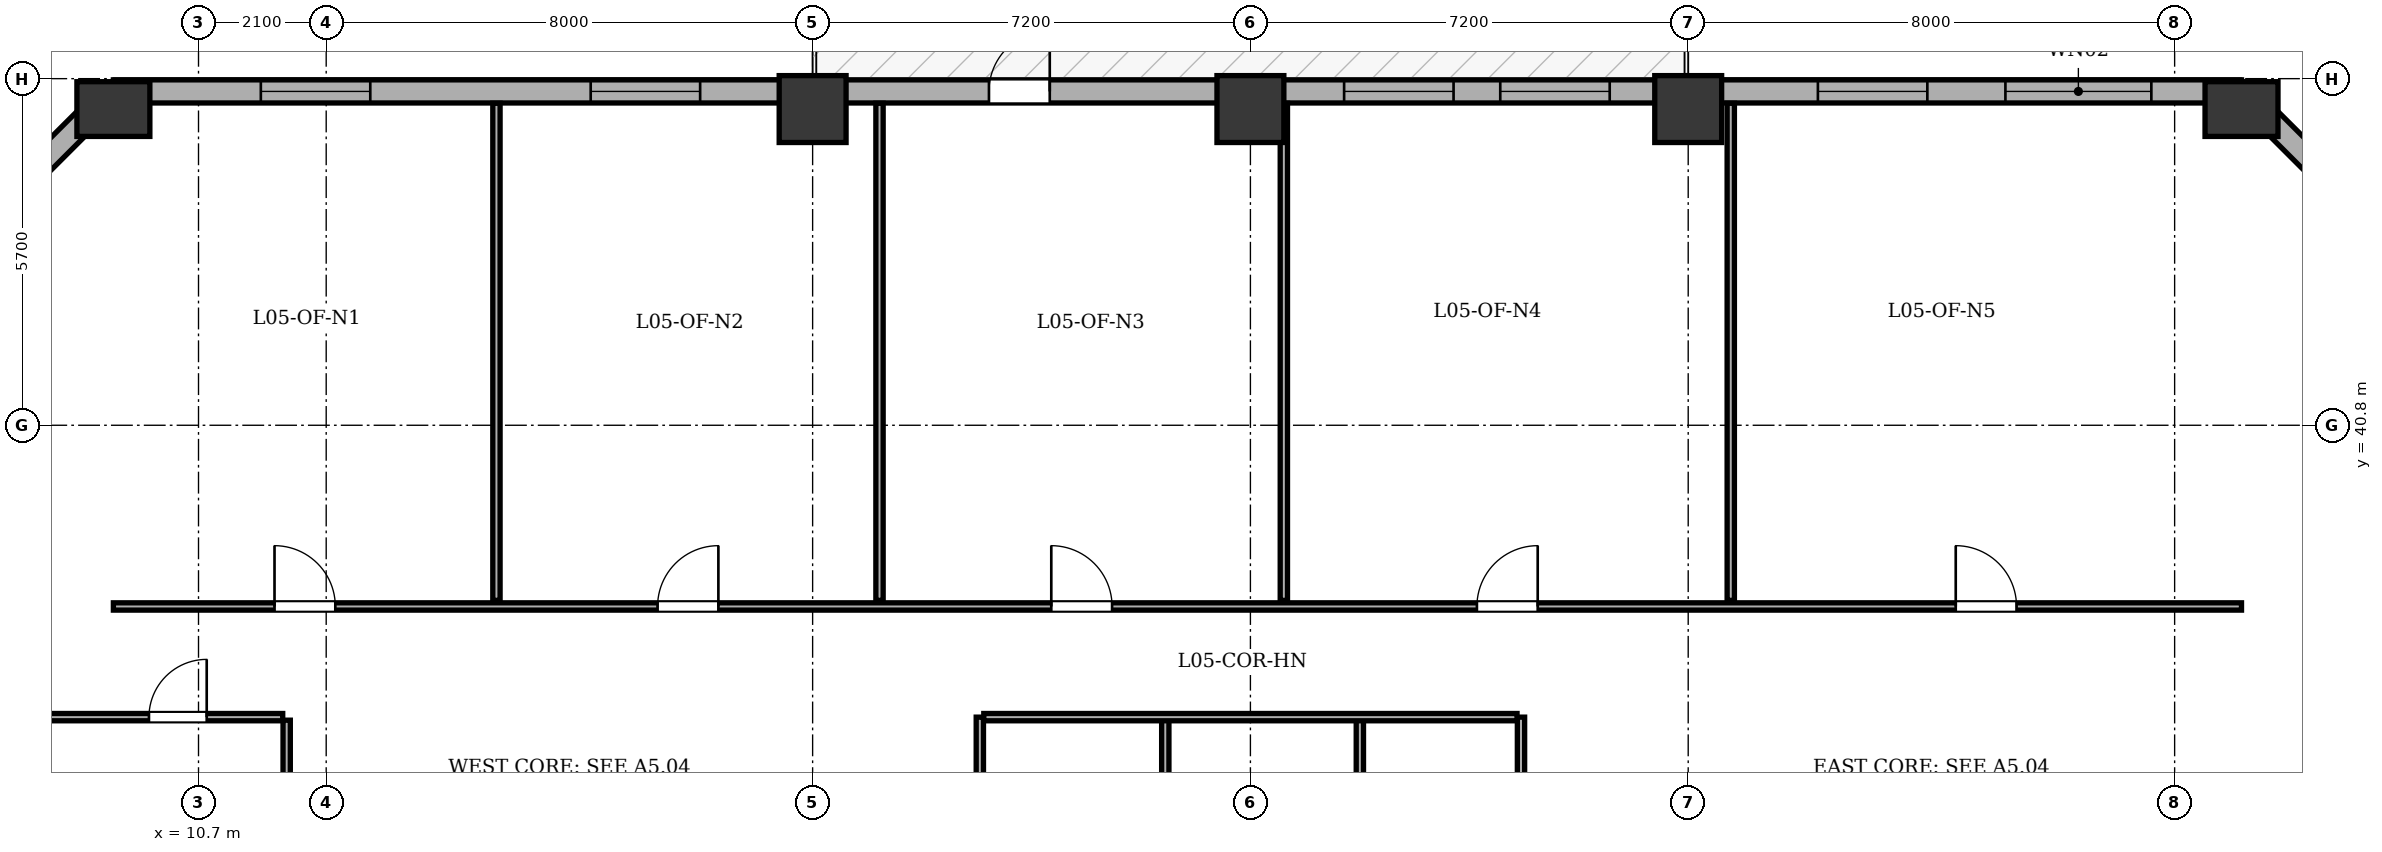
"""IFC4 building model, lengths in metres.
Left out: names, types, materials, properties, quantities, classifications, styles, units other than length and angle.
Written with IfcOpenShell. Run it as: python <this file> out.ifc"""

import sys

from ifc_helpers import new_model, si_unit, direction, frame, frame_2d, origin, origin_2d, place, context, subcontext, project, spatial, rectangle, extrude, element, fill, save


model = new_model("IFC4")
c1 = context("Model", 3, precision=1e-05, world=origin(), true_north=direction((0.0, 1.0)))
c2 = subcontext(c1, "Body", "Model", "MODEL_VIEW")
j1 = project(units=[si_unit("LENGTHUNIT", "METRE"), si_unit("PLANEANGLEUNIT", "RADIAN")], contexts=[c1])
p1 = place(None, origin())
s1 = spatial("IfcSite", under=j1, at=p1, CompositionType="ELEMENT")
p2 = place(p1, origin())
s2 = spatial("IfcBuilding", under=s1, at=p2, CompositionType="ELEMENT")
p3 = place(p2, frame((0.0, 0.0, 24.3)))
s3 = spatial("IfcBuildingStorey", under=s2, at=p3, CompositionType="ELEMENT", Elevation=24.3)
p4 = place(p3, frame((9.3, 46.0, 0.0), z_axis=(0.0, 0.0, 1.0), x_axis=(1.0, 0.0, 0.0)))
e1 = element("IfcColumn", 1, at=p4, inside=s3, PredefinedType="COLUMN", context=c2, shape_type="SweptSolid", body=[
    extrude(rectangle(XDim=0.9, YDim=1.2, at=origin_2d()), origin(), (0.0, 0.0, 1.0), 3.9),
])
for number, where, z_axis, x_axis in (
    (2, (20.8, 46.0, 0.0), (0.0, 0.0, 1.0), (1.0, 0.0, 0.0)),
    (3, (28.0, 46.0, 0.0), (0.0, 0.0, 1.0), (1.0, 0.0, 0.0)),
    (4, (35.2, 46.0, 0.0), (0.0, 0.0, 1.0), (1.0, 0.0, 0.0)),
):
    element("IfcColumn", number, at=place(p3, frame(where, z_axis=z_axis, x_axis=x_axis)), inside=s3, PredefinedType="COLUMN", context=c2, shape_type="SweptSolid", body=[
        extrude(rectangle(XDim=1.1, YDim=1.1, at=origin_2d()), origin(), (0.0, 0.0, 1.0), 3.9),
    ])
p5 = place(p3, frame((44.3, 46.0, 0.0), z_axis=(0.0, 0.0, 1.0), x_axis=(1.0, 0.0, 0.0)))
e5 = element("IfcColumn", 5, at=p5, inside=s3, PredefinedType="COLUMN", context=c2, shape_type="SweptSolid", body=[
    extrude(rectangle(XDim=0.9, YDim=1.2, at=origin_2d()), origin(), (0.0, 0.0, 1.0), 3.9),
])
p6 = place(p3, frame((4.51, 41.5, 0.0), z_axis=(0.0, 0.0, 1.0), x_axis=(0.707106781187, 0.707106781187, 0.0)))
e6 = element("IfcWall", 6, at=p6, inside=s3, PredefinedType="STANDARD", context=c2, shape_type="SweptSolid", body=[
    extrude(rectangle(XDim=6.774, YDim=0.38, at=frame_2d((3.387, 0.0))), origin(), (0.0, 0.0, 1.0), 3.135),
])
p7 = place(p6, frame((2.687, 0.0, 0.8)))
e7 = element("IfcOpeningElement", 7, at=p7, cuts=e6, PredefinedType="OPENING", context=c2, shape_type="SweptSolid", body=[
    extrude(rectangle(XDim=1.4, YDim=1.65, at=frame_2d((0.7, 0.825))), frame((0.0, 0.2, 0.0), z_axis=(0.0, -1.0, 0.0), x_axis=(1.0, 0.0, 0.0)), (0.0, 0.0, 1.0), 0.4),
])
p8 = place(p3, frame((9.3, 46.29, 0.0), z_axis=(0.0, 0.0, 1.0), x_axis=(1.0, 0.0, 0.0)))
e8 = element("IfcWall", 8, at=p8, inside=s3, PredefinedType="STANDARD", context=c2, shape_type="SweptSolid", body=[
    extrude(rectangle(XDim=35.0, YDim=0.38, at=frame_2d((17.5, 0.0))), origin(), (0.0, 0.0, 1.0), 3.135),
])
p9 = place(p8, frame((14.4, 0.0, 0.0)))
e9 = element("IfcOpeningElement", 9, at=p9, cuts=e8, PredefinedType="OPENING", context=c2, shape_type="SweptSolid", body=[
    extrude(rectangle(XDim=1.0, YDim=2.02, at=frame_2d((0.5, 1.01))), frame((0.0, 0.2, 0.0), z_axis=(0.0, -1.0, 0.0), x_axis=(1.0, 0.0, 0.0)), (0.0, 0.0, 1.0), 0.4),
])
p10 = place(p8, frame((2.425, 0.0, 0.8)))
e10 = element("IfcOpeningElement", 10, at=p10, cuts=e8, PredefinedType="OPENING", context=c2, shape_type="SweptSolid", body=[
    extrude(rectangle(XDim=1.8, YDim=1.9, at=frame_2d((0.9, 0.95))), frame((0.0, 0.2, 0.0), z_axis=(0.0, -1.0, 0.0), x_axis=(1.0, 0.0, 0.0)), (0.0, 0.0, 1.0), 0.4),
])
p11 = place(p8, frame((7.85, 0.0, 0.8)))
e11 = element("IfcOpeningElement", 11, at=p11, cuts=e8, PredefinedType="OPENING", context=c2, shape_type="SweptSolid", body=[
    extrude(rectangle(XDim=1.8, YDim=1.9, at=frame_2d((0.9, 0.95))), frame((0.0, 0.2, 0.0), z_axis=(0.0, -1.0, 0.0), x_axis=(1.0, 0.0, 0.0)), (0.0, 0.0, 1.0), 0.4),
])
p12 = place(p8, frame((20.241, 0.0, 0.8)))
e12 = element("IfcOpeningElement", 12, at=p12, cuts=e8, PredefinedType="OPENING", context=c2, shape_type="SweptSolid", body=[
    extrude(rectangle(XDim=1.8, YDim=1.9, at=frame_2d((0.9, 0.95))), frame((0.0, 0.2, 0.0), z_axis=(0.0, -1.0, 0.0), x_axis=(1.0, 0.0, 0.0)), (0.0, 0.0, 1.0), 0.4),
])
p13 = place(p8, frame((22.809, 0.0, 0.8)))
e13 = element("IfcOpeningElement", 13, at=p13, cuts=e8, PredefinedType="OPENING", context=c2, shape_type="SweptSolid", body=[
    extrude(rectangle(XDim=1.8, YDim=1.9, at=frame_2d((0.9, 0.95))), frame((0.0, 0.2, 0.0), z_axis=(0.0, -1.0, 0.0), x_axis=(1.0, 0.0, 0.0)), (0.0, 0.0, 1.0), 0.4),
])
p14 = place(p8, frame((28.033, 0.0, 0.8)))
e14 = element("IfcOpeningElement", 14, at=p14, cuts=e8, PredefinedType="OPENING", context=c2, shape_type="SweptSolid", body=[
    extrude(rectangle(XDim=1.8, YDim=1.9, at=frame_2d((0.9, 0.95))), frame((0.0, 0.2, 0.0), z_axis=(0.0, -1.0, 0.0), x_axis=(1.0, 0.0, 0.0)), (0.0, 0.0, 1.0), 0.4),
])
p15 = place(p8, frame((31.117, 0.0, 0.8)))
e15 = element("IfcOpeningElement", 15, at=p15, cuts=e8, PredefinedType="OPENING", context=c2, shape_type="SweptSolid", body=[
    extrude(rectangle(XDim=2.4, YDim=1.9, at=frame_2d((1.2, 0.95))), frame((0.0, 0.2, 0.0), z_axis=(0.0, -1.0, 0.0), x_axis=(1.0, 0.0, 0.0)), (0.0, 0.0, 1.0), 0.4),
])
p16 = place(p3, frame((44.3, 46.29, 0.0), z_axis=(0.0, 0.0, 1.0), x_axis=(0.707106781187, -0.707106781187, 0.0)))
e16 = element("IfcWall", 16, at=p16, inside=s3, PredefinedType="STANDARD", context=c2, shape_type="SweptSolid", body=[
    extrude(rectangle(XDim=6.774, YDim=0.38, at=frame_2d((3.387, 0.0))), origin(), (0.0, 0.0, 1.0), 3.135),
])
p17 = place(p16, frame((2.687, 0.0, 0.8)))
e17 = element("IfcOpeningElement", 17, at=p17, cuts=e16, PredefinedType="OPENING", context=c2, shape_type="SweptSolid", body=[
    extrude(rectangle(XDim=1.4, YDim=1.65, at=frame_2d((0.7, 0.825))), frame((0.0, 0.2, 0.0), z_axis=(0.0, -1.0, 0.0), x_axis=(1.0, 0.0, 0.0)), (0.0, 0.0, 1.0), 0.4),
])
for number, where, z_axis, x_axis in (
    (18, (23.55, 24.715, 0.0), (0.0, 0.0, 1.0), (0.0, 1.0, 0.0)),
    (19, (32.45, 24.715, 0.0), (0.0, 0.0, 1.0), (0.0, 1.0, 0.0)),
    (20, (26.6, 24.715, 0.0), (0.0, 0.0, 1.0), (0.0, 1.0, 0.0)),
):
    element("IfcWall", number, at=place(p3, frame(where, z_axis=z_axis, x_axis=x_axis)), inside=s3, PredefinedType="PARTITIONING", context=c2, shape_type="SweptSolid", body=[
        extrude(rectangle(XDim=11.285, YDim=0.12, at=frame_2d((5.643, 0.0))), origin(), (0.0, 0.0, 1.0), 3.6),
    ])
p18 = place(p3, frame((29.8, 24.715, 0.0), z_axis=(0.0, 0.0, 1.0), x_axis=(0.0, 1.0, 0.0)))
e21 = element("IfcWall", 21, at=p18, inside=s3, PredefinedType="PARTITIONING", context=c2, shape_type="SweptSolid", body=[
    extrude(rectangle(XDim=11.285, YDim=0.12, at=frame_2d((5.643, 0.0))), origin(), (0.0, 0.0, 1.0), 3.135),
])
p19 = place(p3, frame((23.615, 36.0, 0.0), z_axis=(0.0, 0.0, 1.0), x_axis=(1.0, 0.0, 0.0)))
e22 = element("IfcWall", 22, at=p19, inside=s3, PredefinedType="PARTITIONING", context=c2, shape_type="SweptSolid", body=[
    extrude(rectangle(XDim=8.77, YDim=0.12, at=frame_2d((4.385, 0.0))), origin(), (0.0, 0.0, 1.0), 3.6),
])
p20 = place(p3, frame((9.3, 37.82, 0.0), z_axis=(0.0, 0.0, 1.0), x_axis=(1.0, 0.0, 0.0)))
e23 = element("IfcWall", 23, at=p20, inside=s3, PredefinedType="PARTITIONING", context=c2, shape_type="SweptSolid", body=[
    extrude(rectangle(XDim=35.0, YDim=0.12, at=frame_2d((17.5, 0.0))), origin(), (0.0, 0.0, 1.0), 3.6),
])
p21 = place(p20, frame((2.65, 0.0, 0.0)))
e24 = element("IfcOpeningElement", 24, at=p21, cuts=e23, PredefinedType="OPENING", context=c2, shape_type="SweptSolid", body=[
    extrude(rectangle(XDim=1.0, YDim=2.1, at=frame_2d((0.5, 1.05))), frame((0.0, 0.07, 0.0), z_axis=(0.0, -1.0, 0.0), x_axis=(1.0, 0.0, 0.0)), (0.0, 0.0, 1.0), 0.14),
])
p22 = place(p20, frame((8.95, 0.0, 0.0)))
e25 = element("IfcOpeningElement", 25, at=p22, cuts=e23, PredefinedType="OPENING", context=c2, shape_type="SweptSolid", body=[
    extrude(rectangle(XDim=1.0, YDim=2.1, at=frame_2d((0.5, 1.05))), frame((0.0, 0.07, 0.0), z_axis=(0.0, -1.0, 0.0), x_axis=(1.0, 0.0, 0.0)), (0.0, 0.0, 1.0), 0.14),
])
p23 = place(p20, frame((15.425, 0.0, 0.0)))
e26 = element("IfcOpeningElement", 26, at=p23, cuts=e23, PredefinedType="OPENING", context=c2, shape_type="SweptSolid", body=[
    extrude(rectangle(XDim=1.0, YDim=2.1, at=frame_2d((0.5, 1.05))), frame((0.0, 0.07, 0.0), z_axis=(0.0, -1.0, 0.0), x_axis=(1.0, 0.0, 0.0)), (0.0, 0.0, 1.0), 0.14),
])
p24 = place(p20, frame((22.425, 0.0, 0.0)))
e27 = element("IfcOpeningElement", 27, at=p24, cuts=e23, PredefinedType="OPENING", context=c2, shape_type="SweptSolid", body=[
    extrude(rectangle(XDim=1.0, YDim=2.1, at=frame_2d((0.5, 1.05))), frame((0.0, 0.07, 0.0), z_axis=(0.0, -1.0, 0.0), x_axis=(1.0, 0.0, 0.0)), (0.0, 0.0, 1.0), 0.14),
])
p25 = place(p20, frame((30.3, 0.0, 0.0)))
e28 = element("IfcOpeningElement", 28, at=p25, cuts=e23, PredefinedType="OPENING", context=c2, shape_type="SweptSolid", body=[
    extrude(rectangle(XDim=1.0, YDim=2.1, at=frame_2d((0.5, 1.05))), frame((0.0, 0.07, 0.0), z_axis=(0.0, -1.0, 0.0), x_axis=(1.0, 0.0, 0.0)), (0.0, 0.0, 1.0), 0.14),
])
for number, where, z_axis, x_axis in (
    (29, (15.6, 37.92, 0.0), (0.0, 0.0, 1.0), (0.0, 1.0, 0.0)),
    (30, (21.9, 37.92, 0.0), (0.0, 0.0, 1.0), (0.0, 1.0, 0.0)),
    (31, (28.55, 37.92, 0.0), (0.0, 0.0, 1.0), (0.0, 1.0, 0.0)),
    (32, (35.9, 37.92, 0.0), (0.0, 0.0, 1.0), (0.0, 1.0, 0.0)),
):
    element("IfcWall", number, at=place(p3, frame(where, z_axis=z_axis, x_axis=x_axis)), inside=s3, PredefinedType="PARTITIONING", context=c2, shape_type="SweptSolid", body=[
        extrude(rectangle(XDim=8.175, YDim=0.12, at=frame_2d((4.087, 0.0))), origin(), (0.0, 0.0, 1.0), 3.6),
    ])
p26 = place(p3, frame((12.15, 18.45, 0.0), z_axis=(0.0, 0.0, 1.0), x_axis=(0.0, 1.0, 0.0)))
e33 = element("IfcWall", 33, at=p26, inside=s3, PredefinedType="PARTITIONING", context=c2, shape_type="SweptSolid", body=[
    extrude(rectangle(XDim=17.5, YDim=0.12, at=frame_2d((8.75, 0.0))), origin(), (0.0, 0.0, 1.0), 3.6),
])
p27 = place(p3, frame((4.705, 36.0, 0.0), z_axis=(0.0, 0.0, 1.0), x_axis=(1.0, 0.0, 0.0)))
e34 = element("IfcWall", 34, at=p27, inside=s3, PredefinedType="PARTITIONING", context=c2, shape_type="SweptSolid", body=[
    extrude(rectangle(XDim=7.38, YDim=0.12, at=frame_2d((3.69, 0.0))), origin(), (0.0, 0.0, 1.0), 3.6),
])
p28 = place(p27, frame((5.18, 0.0, 0.0)))
e35 = element("IfcOpeningElement", 35, at=p28, cuts=e34, PredefinedType="OPENING", context=c2, shape_type="SweptSolid", body=[
    extrude(rectangle(XDim=0.95, YDim=2.1, at=frame_2d((0.475, 1.05))), frame((0.0, 0.07, 0.0), z_axis=(0.0, -1.0, 0.0), x_axis=(1.0, 0.0, 0.0)), (0.0, 0.0, 1.0), 0.14),
])
p29 = place(p9, origin())
e36 = element("IfcDoor", 36, at=p29, inside=s3, OperationType="SINGLE_SWING_RIGHT", PredefinedType="DOOR", context=c2, shape_type="SweptSolid", body=[
    extrude(rectangle(XDim=1.0, YDim=2.02, at=frame_2d((0.5, 1.01))), frame((0.0, 0.025, 0.0), z_axis=(0.0, -1.0, 0.0), x_axis=(1.0, 0.0, 0.0)), (0.0, 0.0, 1.0), 0.05),
])
fill(e9, e36)
p30 = place(p10, origin())
e37 = element("IfcWindow", 37, at=p30, inside=s3, PartitioningType="SINGLE_PANEL", PredefinedType="WINDOW", context=c2, shape_type="SweptSolid", body=[
    extrude(rectangle(XDim=1.8, YDim=1.9, at=frame_2d((0.9, 0.95))), frame((0.0, -0.01, 0.0), z_axis=(0.0, -1.0, 0.0), x_axis=(1.0, 0.0, 0.0)), (0.0, 0.0, 1.0), 0.06),
])
fill(e10, e37)
p31 = place(p11, origin())
e38 = element("IfcWindow", 38, at=p31, inside=s3, PartitioningType="SINGLE_PANEL", PredefinedType="WINDOW", context=c2, shape_type="SweptSolid", body=[
    extrude(rectangle(XDim=1.8, YDim=1.9, at=frame_2d((0.9, 0.95))), frame((0.0, -0.01, 0.0), z_axis=(0.0, -1.0, 0.0), x_axis=(1.0, 0.0, 0.0)), (0.0, 0.0, 1.0), 0.06),
])
fill(e11, e38)
p32 = place(p12, origin())
e39 = element("IfcWindow", 39, at=p32, inside=s3, PartitioningType="SINGLE_PANEL", PredefinedType="WINDOW", context=c2, shape_type="SweptSolid", body=[
    extrude(rectangle(XDim=1.8, YDim=1.9, at=frame_2d((0.9, 0.95))), frame((0.0, -0.01, 0.0), z_axis=(0.0, -1.0, 0.0), x_axis=(1.0, 0.0, 0.0)), (0.0, 0.0, 1.0), 0.06),
])
fill(e12, e39)
p33 = place(p13, origin())
e40 = element("IfcWindow", 40, at=p33, inside=s3, PartitioningType="SINGLE_PANEL", PredefinedType="WINDOW", context=c2, shape_type="SweptSolid", body=[
    extrude(rectangle(XDim=1.8, YDim=1.9, at=frame_2d((0.9, 0.95))), frame((0.0, -0.01, 0.0), z_axis=(0.0, -1.0, 0.0), x_axis=(1.0, 0.0, 0.0)), (0.0, 0.0, 1.0), 0.06),
])
fill(e13, e40)
p34 = place(p14, origin())
e41 = element("IfcWindow", 41, at=p34, inside=s3, PartitioningType="SINGLE_PANEL", PredefinedType="WINDOW", context=c2, shape_type="SweptSolid", body=[
    extrude(rectangle(XDim=1.8, YDim=1.9, at=frame_2d((0.9, 0.95))), frame((0.0, -0.01, 0.0), z_axis=(0.0, -1.0, 0.0), x_axis=(1.0, 0.0, 0.0)), (0.0, 0.0, 1.0), 0.06),
])
fill(e14, e41)
p35 = place(p15, origin())
e42 = element("IfcWindow", 42, at=p35, inside=s3, PartitioningType="SINGLE_PANEL", PredefinedType="WINDOW", context=c2, shape_type="SweptSolid", body=[
    extrude(rectangle(XDim=2.4, YDim=1.9, at=frame_2d((1.2, 0.95))), frame((0.0, -0.01, 0.0), z_axis=(0.0, -1.0, 0.0), x_axis=(1.0, 0.0, 0.0)), (0.0, 0.0, 1.0), 0.06),
])
fill(e15, e42)
p36 = place(p21, origin())
e43 = element("IfcDoor", 43, at=p36, inside=s3, OperationType="SINGLE_SWING_LEFT", PredefinedType="DOOR", context=c2, shape_type="SweptSolid", body=[
    extrude(rectangle(XDim=1.0, YDim=2.1, at=frame_2d((0.5, 1.05))), frame((0.0, 0.025, 0.0), z_axis=(0.0, -1.0, 0.0), x_axis=(1.0, 0.0, 0.0)), (0.0, 0.0, 1.0), 0.05),
])
fill(e24, e43)
p37 = place(p22, origin())
e44 = element("IfcDoor", 44, at=p37, inside=s3, OperationType="SINGLE_SWING_RIGHT", PredefinedType="DOOR", context=c2, shape_type="SweptSolid", body=[
    extrude(rectangle(XDim=1.0, YDim=2.1, at=frame_2d((0.5, 1.05))), frame((0.0, 0.025, 0.0), z_axis=(0.0, -1.0, 0.0), x_axis=(1.0, 0.0, 0.0)), (0.0, 0.0, 1.0), 0.05),
])
fill(e25, e44)
p38 = place(p23, origin())
e45 = element("IfcDoor", 45, at=p38, inside=s3, OperationType="SINGLE_SWING_LEFT", PredefinedType="DOOR", context=c2, shape_type="SweptSolid", body=[
    extrude(rectangle(XDim=1.0, YDim=2.1, at=frame_2d((0.5, 1.05))), frame((0.0, 0.025, 0.0), z_axis=(0.0, -1.0, 0.0), x_axis=(1.0, 0.0, 0.0)), (0.0, 0.0, 1.0), 0.05),
])
fill(e26, e45)
p39 = place(p24, origin())
e46 = element("IfcDoor", 46, at=p39, inside=s3, OperationType="SINGLE_SWING_RIGHT", PredefinedType="DOOR", context=c2, shape_type="SweptSolid", body=[
    extrude(rectangle(XDim=1.0, YDim=2.1, at=frame_2d((0.5, 1.05))), frame((0.0, 0.025, 0.0), z_axis=(0.0, -1.0, 0.0), x_axis=(1.0, 0.0, 0.0)), (0.0, 0.0, 1.0), 0.05),
])
fill(e27, e46)
p40 = place(p25, origin())
e47 = element("IfcDoor", 47, at=p40, inside=s3, OperationType="SINGLE_SWING_LEFT", PredefinedType="DOOR", context=c2, shape_type="SweptSolid", body=[
    extrude(rectangle(XDim=1.0, YDim=2.1, at=frame_2d((0.5, 1.05))), frame((0.0, 0.025, 0.0), z_axis=(0.0, -1.0, 0.0), x_axis=(1.0, 0.0, 0.0)), (0.0, 0.0, 1.0), 0.05),
])
fill(e28, e47)
p41 = place(p28, origin())
e48 = element("IfcDoor", 48, at=p41, inside=s3, OperationType="SINGLE_SWING_RIGHT", PredefinedType="DOOR", context=c2, shape_type="SweptSolid", body=[
    extrude(rectangle(XDim=0.95, YDim=2.1, at=frame_2d((0.475, 1.05))), frame((0.0, 0.025, 0.0), z_axis=(0.0, -1.0, 0.0), x_axis=(1.0, 0.0, 0.0)), (0.0, 0.0, 1.0), 0.05),
])
fill(e35, e48)
save(model, sys.argv[1])
